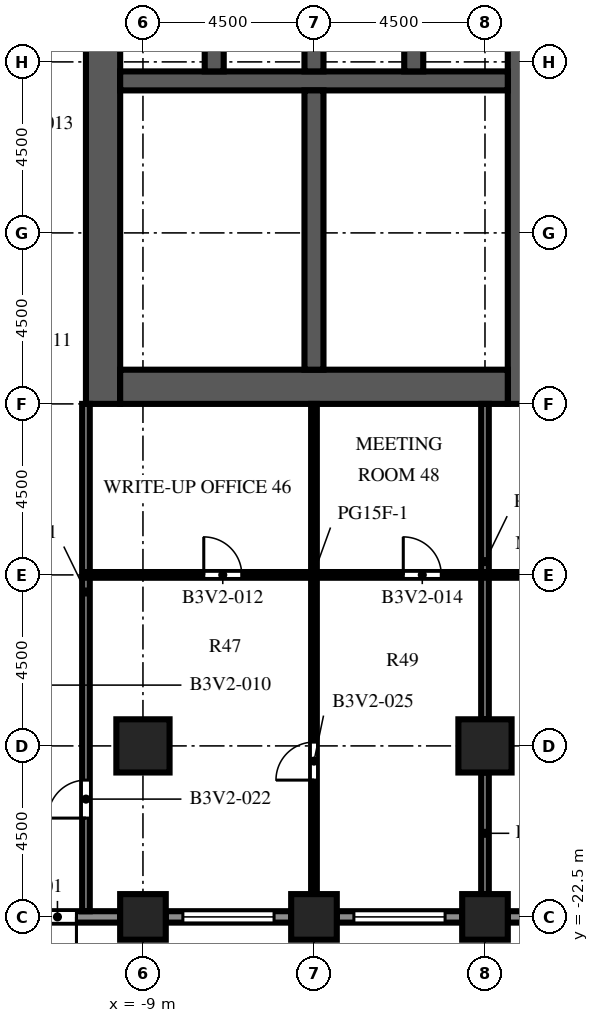
"""IFC4 building model, lengths in metres.
Left out: names, types, materials, properties, quantities, classifications, styles, units other than length and angle.
Written with IfcOpenShell. Run it as: python <this file> out.ifc"""

import sys

from ifc_helpers import new_model, si_unit, direction, frame, frame_2d, origin, origin_2d, place, context, subcontext, project, spatial, rectangle, extrude, element, fill, save


model = new_model("IFC4")
c1 = context("Model", 3, precision=1e-05, world=origin(), true_north=direction((0.0, 1.0)))
c2 = subcontext(c1, "Body", "Model", "MODEL_VIEW")
j1 = project(units=[si_unit("LENGTHUNIT", "METRE"), si_unit("PLANEANGLEUNIT", "RADIAN")], contexts=[c1])
p1 = place(None, origin())
s1 = spatial("IfcSite", under=j1, at=p1, CompositionType="ELEMENT")
p2 = place(p1, origin())
s2 = spatial("IfcBuilding", under=s1, at=p2, CompositionType="ELEMENT")
p3 = place(p2, frame((0.0, 0.0, 102.5)))
s3 = spatial("IfcBuildingStorey", under=s2, at=p3, CompositionType="ELEMENT", Elevation=102.5)
for number, where, z_axis, x_axis in (
    (1, (-9.0, -22.5, 0.0), (0.0, 0.0, 1.0), (1.0, 0.0, 0.0)),
    (2, (-4.5, -22.5, 0.0), (0.0, 0.0, 1.0), (1.0, 0.0, 0.0)),
    (3, (0.0, -22.5, 0.0), (0.0, 0.0, 1.0), (1.0, 0.0, 0.0)),
):
    element("IfcColumn", number, at=place(p3, frame(where, z_axis=z_axis, x_axis=x_axis)), inside=s3, PredefinedType="COLUMN", context=c2, shape_type="SweptSolid", body=[
        extrude(rectangle(XDim=1.2, YDim=1.2, at=origin_2d()), origin(), (0.0, 0.0, 1.0), 4.1),
    ])
for number, where, z_axis, x_axis in (
    (4, (-9.0, -18.0, 0.0), (0.0, 0.0, 1.0), (1.0, 0.0, 0.0)),
    (5, (0.0, -18.0, 0.0), (0.0, 0.0, 1.0), (1.0, 0.0, 0.0)),
):
    element("IfcColumn", number, at=place(p3, frame(where, z_axis=z_axis, x_axis=x_axis)), inside=s3, PredefinedType="COLUMN", context=c2, shape_type="SweptSolid", body=[
        extrude(rectangle(XDim=1.4, YDim=1.4, at=origin_2d()), origin(), (0.0, 0.0, 1.0), 4.1),
    ])
p4 = place(p3, frame((-10.05, -9.0, 0.0), z_axis=(0.0, 0.0, 1.0), x_axis=(0.0, 1.0, 0.0)))
e6 = element("IfcWall", 6, at=p4, inside=s3, PredefinedType="SHEAR", context=c2, shape_type="SweptSolid", body=[
    extrude(rectangle(XDim=27.5, YDim=0.9, at=frame_2d((13.75, 0.0))), origin(), (0.0, 0.0, 1.0), 4.1),
])
p5 = place(p4, frame((12.55, 0.0, 0.0)))
e7 = element("IfcOpeningElement", 7, at=p5, cuts=e6, PredefinedType="OPENING", context=c2, shape_type="SweptSolid", body=[
    extrude(rectangle(XDim=2.4, YDim=2.4, at=frame_2d((1.2, 1.2))), frame((0.0, 0.46, 0.0), z_axis=(0.0, -1.0, 0.0), x_axis=(1.0, 0.0, 0.0)), (0.0, 0.0, 1.0), 0.92),
])
p6 = place(p4, frame((6.825, 0.0, 0.0)))
e8 = element("IfcOpeningElement", 8, at=p6, cuts=e6, PredefinedType="OPENING", context=c2, shape_type="SweptSolid", body=[
    extrude(rectangle(XDim=1.2, YDim=2.1, at=frame_2d((0.6, 1.05))), frame((0.0, 0.46, 0.0), z_axis=(0.0, -1.0, 0.0), x_axis=(1.0, 0.0, 0.0)), (0.0, 0.0, 1.0), 0.92),
])
p7 = place(p4, frame((19.475, 0.0, 0.0)))
e9 = element("IfcOpeningElement", 9, at=p7, cuts=e6, PredefinedType="OPENING", context=c2, shape_type="SweptSolid", body=[
    extrude(rectangle(XDim=1.2, YDim=2.1, at=frame_2d((0.6, 1.05))), frame((0.0, 0.46, 0.0), z_axis=(0.0, -1.0, 0.0), x_axis=(1.0, 0.0, 0.0)), (0.0, 0.0, 1.0), 0.92),
])
p8 = place(p3, frame((1.05, -9.0, 0.0), z_axis=(0.0, 0.0, 1.0), x_axis=(0.0, 1.0, 0.0)))
e10 = element("IfcWall", 10, at=p8, inside=s3, PredefinedType="SHEAR", context=c2, shape_type="SweptSolid", body=[
    extrude(rectangle(XDim=27.5, YDim=0.9, at=frame_2d((13.75, 0.0))), origin(), (0.0, 0.0, 1.0), 4.1),
])
p9 = place(p8, frame((12.55, 0.0, 0.0)))
e11 = element("IfcOpeningElement", 11, at=p9, cuts=e10, PredefinedType="OPENING", context=c2, shape_type="SweptSolid", body=[
    extrude(rectangle(XDim=2.4, YDim=2.4, at=frame_2d((1.2, 1.2))), frame((0.0, 0.46, 0.0), z_axis=(0.0, -1.0, 0.0), x_axis=(1.0, 0.0, 0.0)), (0.0, 0.0, 1.0), 0.92),
])
p10 = place(p8, frame((3.893, 0.0, 0.0)))
e12 = element("IfcOpeningElement", 12, at=p10, cuts=e10, PredefinedType="OPENING", context=c2, shape_type="SweptSolid", body=[
    extrude(rectangle(XDim=0.923, YDim=2.1, at=frame_2d((0.461, 1.05))), frame((0.0, 0.46, 0.0), z_axis=(0.0, -1.0, 0.0), x_axis=(1.0, 0.0, 0.0)), (0.0, 0.0, 1.0), 0.92),
])
p11 = place(p8, frame((23.427, 0.0, 0.0)))
e13 = element("IfcOpeningElement", 13, at=p11, cuts=e10, PredefinedType="OPENING", context=c2, shape_type="SweptSolid", body=[
    extrude(rectangle(XDim=1.2, YDim=2.1, at=frame_2d((0.6, 1.05))), frame((0.0, 0.46, 0.0), z_axis=(0.0, -1.0, 0.0), x_axis=(1.0, 0.0, 0.0)), (0.0, 0.0, 1.0), 0.92),
])
p12 = place(p3, frame((-9.6, -8.55, 0.0), z_axis=(0.0, 0.0, 1.0), x_axis=(1.0, 0.0, 0.0)))
e14 = element("IfcWall", 14, at=p12, inside=s3, PredefinedType="SHEAR", context=c2, shape_type="SweptSolid", body=[
    extrude(rectangle(XDim=10.2, YDim=0.9, at=frame_2d((5.1, 0.0))), origin(), (0.0, 0.0, 1.0), 4.1),
])
p13 = place(p3, frame((-9.6, -0.5, 0.0), z_axis=(0.0, 0.0, 1.0), x_axis=(1.0, 0.0, 0.0)))
e15 = element("IfcWall", 15, at=p13, inside=s3, PredefinedType="SHEAR", context=c2, shape_type="SweptSolid", body=[
    extrude(rectangle(XDim=10.2, YDim=0.5, at=frame_2d((5.1, 0.0))), origin(), (0.0, 0.0, 1.0), 4.1),
])
for number, where, z_axis, x_axis in (
    (16, (-7.125, -0.25, 0.0), (0.0, 0.0, 1.0), (0.0, 1.0, 0.0)),
    (17, (-4.5, -0.25, 0.0), (0.0, 0.0, 1.0), (0.0, 1.0, 0.0)),
    (18, (-1.875, -0.25, 0.0), (0.0, 0.0, 1.0), (0.0, 1.0, 0.0)),
):
    element("IfcWall", number, at=place(p3, frame(where, z_axis=z_axis, x_axis=x_axis)), inside=s3, PredefinedType="SHEAR", context=c2, shape_type="SweptSolid", body=[
        extrude(rectangle(XDim=2.8, YDim=0.5, at=frame_2d((1.4, 0.0))), origin(), (0.0, 0.0, 1.0), 4.1),
    ])
p14 = place(p3, frame((-4.5, -8.1, 0.0), z_axis=(0.0, 0.0, 1.0), x_axis=(0.0, 1.0, 0.0)))
e19 = element("IfcWall", 19, at=p14, inside=s3, PredefinedType="SHEAR", context=c2, shape_type="SweptSolid", body=[
    extrude(rectangle(XDim=7.35, YDim=0.5, at=frame_2d((3.675, 0.0))), origin(), (0.0, 0.0, 1.0), 4.1),
])
p15 = place(p3, frame((-9.6, -22.5, 0.0), z_axis=(0.0, 0.0, 1.0), x_axis=(-1.0, 0.0, 0.0)))
e20 = element("IfcWall", 20, at=p15, inside=s3, PredefinedType="SOLIDWALL", context=c2, shape_type="SweptSolid", body=[
    extrude(rectangle(XDim=3.3, YDim=0.3, at=frame_2d((1.65, 0.0))), origin(), (0.0, 0.0, 1.0), 2.75),
])
p16 = place(p15, frame((1.15, 0.0, 0.0)))
e21 = element("IfcOpeningElement", 21, at=p16, cuts=e20, PredefinedType="OPENING", context=c2, shape_type="SweptSolid", body=[
    extrude(rectangle(XDim=1.0, YDim=2.2, at=frame_2d((0.5, 1.1))), frame((0.0, 0.16, 0.0), z_axis=(0.0, -1.0, 0.0), x_axis=(1.0, 0.0, 0.0)), (0.0, 0.0, 1.0), 0.32),
])
p17 = place(p3, frame((-5.1, -22.5, 0.0), z_axis=(0.0, 0.0, 1.0), x_axis=(-1.0, 0.0, 0.0)))
e22 = element("IfcWall", 22, at=p17, inside=s3, PredefinedType="SOLIDWALL", context=c2, shape_type="SweptSolid", body=[
    extrude(rectangle(XDim=3.3, YDim=0.3, at=frame_2d((1.65, 0.0))), origin(), (0.0, 0.0, 1.0), 2.75),
])
p18 = place(p17, frame((0.45, 0.0, 0.8)))
e23 = element("IfcOpeningElement", 23, at=p18, cuts=e22, PredefinedType="OPENING", context=c2, shape_type="SweptSolid", body=[
    extrude(rectangle(XDim=2.4, YDim=1.7, at=frame_2d((1.2, 0.85))), frame((0.0, 0.16, 0.0), z_axis=(0.0, -1.0, 0.0), x_axis=(1.0, 0.0, 0.0)), (0.0, 0.0, 1.0), 0.32),
])
p19 = place(p3, frame((-0.6, -22.5, 0.0), z_axis=(0.0, 0.0, 1.0), x_axis=(-1.0, 0.0, 0.0)))
e24 = element("IfcWall", 24, at=p19, inside=s3, PredefinedType="SOLIDWALL", context=c2, shape_type="SweptSolid", body=[
    extrude(rectangle(XDim=3.3, YDim=0.3, at=frame_2d((1.65, 0.0))), origin(), (0.0, 0.0, 1.0), 2.75),
])
p20 = place(p19, frame((0.45, 0.0, 0.8)))
e25 = element("IfcOpeningElement", 25, at=p20, cuts=e24, PredefinedType="OPENING", context=c2, shape_type="SweptSolid", body=[
    extrude(rectangle(XDim=2.4, YDim=1.7, at=frame_2d((1.2, 0.85))), frame((0.0, 0.16, 0.0), z_axis=(0.0, -1.0, 0.0), x_axis=(1.0, 0.0, 0.0)), (0.0, 0.0, 1.0), 0.32),
])
p21 = place(p3, frame((3.9, -22.5, 0.0), z_axis=(0.0, 0.0, 1.0), x_axis=(-1.0, 0.0, 0.0)))
e26 = element("IfcWall", 26, at=p21, inside=s3, PredefinedType="SOLIDWALL", context=c2, shape_type="SweptSolid", body=[
    extrude(rectangle(XDim=3.3, YDim=0.3, at=frame_2d((1.65, 0.0))), origin(), (0.0, 0.0, 1.0), 2.75),
])
p22 = place(p21, frame((0.45, 0.0, 0.8)))
e27 = element("IfcOpeningElement", 27, at=p22, cuts=e26, PredefinedType="OPENING", context=c2, shape_type="SweptSolid", body=[
    extrude(rectangle(XDim=2.4, YDim=1.7, at=frame_2d((1.2, 0.85))), frame((0.0, 0.16, 0.0), z_axis=(0.0, -1.0, 0.0), x_axis=(1.0, 0.0, 0.0)), (0.0, 0.0, 1.0), 0.32),
])
p23 = place(p3, frame((-4.25, -5.307, 0.0), z_axis=(0.0, 0.0, 1.0), x_axis=(1.0, 0.0, 0.0)))
e28 = element("IfcWall", 28, at=p23, inside=s3, PredefinedType="PARTITIONING", context=c2, shape_type="SweptSolid", body=[
    extrude(rectangle(XDim=4.85, YDim=0.1, at=frame_2d((2.425, 0.0))), origin(), (0.0, 0.0, 1.0), 3.65),
])
p24 = place(p23, frame((1.925, 0.0, 0.0)))
e29 = element("IfcOpeningElement", 29, at=p24, cuts=e28, PredefinedType="OPENING", context=c2, shape_type="SweptSolid", body=[
    extrude(rectangle(XDim=1.0, YDim=2.1, at=frame_2d((0.5, 1.05))), frame((0.0, 0.06, 0.0), z_axis=(0.0, -1.0, 0.0), x_axis=(1.0, 0.0, 0.0)), (0.0, 0.0, 1.0), 0.12),
])
p25 = place(p3, frame((-2.407, -3.984, 0.0), z_axis=(0.0, 0.0, 1.0), x_axis=(1.0, 0.0, 0.0)))
e30 = element("IfcWall", 30, at=p25, inside=s3, PredefinedType="PARTITIONING", context=c2, shape_type="SweptSolid", body=[
    extrude(rectangle(XDim=3.007, YDim=0.1, at=frame_2d((1.503, 0.0))), origin(), (0.0, 0.0, 1.0), 3.65),
])
p26 = place(p25, frame((1.003, 0.0, 0.0)))
e31 = element("IfcOpeningElement", 31, at=p26, cuts=e30, PredefinedType="OPENING", context=c2, shape_type="SweptSolid", body=[
    extrude(rectangle(XDim=1.0, YDim=2.1, at=frame_2d((0.5, 1.05))), frame((0.0, 0.06, 0.0), z_axis=(0.0, -1.0, 0.0), x_axis=(1.0, 0.0, 0.0)), (0.0, 0.0, 1.0), 0.12),
])
p27 = place(p3, frame((-4.25, -3.984, 0.0), z_axis=(0.0, 0.0, 1.0), x_axis=(1.0, 0.0, 0.0)))
e32 = element("IfcWall", 32, at=p27, inside=s3, PredefinedType="PARTITIONING", context=c2, shape_type="SweptSolid", body=[
    extrude(rectangle(XDim=1.843, YDim=0.1, at=frame_2d((0.921, 0.0))), origin(), (0.0, 0.0, 1.0), 3.65),
])
p28 = place(p27, frame((0.421, 0.0, 0.0)))
e33 = element("IfcOpeningElement", 33, at=p28, cuts=e32, PredefinedType="OPENING", context=c2, shape_type="SweptSolid", body=[
    extrude(rectangle(XDim=1.0, YDim=2.1, at=frame_2d((0.5, 1.05))), frame((0.0, 0.06, 0.0), z_axis=(0.0, -1.0, 0.0), x_axis=(1.0, 0.0, 0.0)), (0.0, 0.0, 1.0), 0.12),
])
p29 = place(p3, frame((-2.407, -3.984, 0.0), z_axis=(0.0, 0.0, 1.0), x_axis=(0.0, 1.0, 0.0)))
e34 = element("IfcWall", 34, at=p29, inside=s3, PredefinedType="PARTITIONING", context=c2, shape_type="SweptSolid", body=[
    extrude(rectangle(XDim=3.234, YDim=0.1, at=frame_2d((1.617, 0.0))), origin(), (0.0, 0.0, 1.0), 3.65),
])
p30 = place(p3, frame((-10.5, -9.0, 0.0), z_axis=(0.0, 0.0, 1.0), x_axis=(0.0, -1.0, 0.0)))
e35 = element("IfcWall", 35, at=p30, inside=s3, PredefinedType="PARTITIONING", context=c2, shape_type="SweptSolid", body=[
    extrude(rectangle(XDim=13.35, YDim=0.2, at=frame_2d((6.675, 0.0))), origin(), (0.0, 0.0, 1.0), 3.65),
])
p31 = place(p30, frame((9.9, 0.0, 0.0)))
e36 = element("IfcOpeningElement", 36, at=p31, cuts=e35, PredefinedType="OPENING", context=c2, shape_type="SweptSolid", body=[
    extrude(rectangle(XDim=1.0, YDim=2.1, at=frame_2d((0.5, 1.05))), frame((0.0, 0.11, 0.0), z_axis=(0.0, -1.0, 0.0), x_axis=(1.0, 0.0, 0.0)), (0.0, 0.0, 1.0), 0.22),
])
p32 = place(p3, frame((-4.5, -9.0, 0.0), z_axis=(0.0, 0.0, 1.0), x_axis=(0.0, -1.0, 0.0)))
e37 = element("IfcWall", 37, at=p32, inside=s3, PredefinedType="PARTITIONING", context=c2, shape_type="SweptSolid", body=[
    extrude(rectangle(XDim=12.9, YDim=0.15, at=frame_2d((6.45, 0.0))), origin(), (0.0, 0.0, 1.0), 3.65),
])
p33 = place(p32, frame((8.9, 0.0, 0.0)))
e38 = element("IfcOpeningElement", 38, at=p33, cuts=e37, PredefinedType="OPENING", context=c2, shape_type="SweptSolid", body=[
    extrude(rectangle(XDim=1.0, YDim=2.1, at=frame_2d((0.5, 1.05))), frame((0.0, 0.085, 0.0), z_axis=(0.0, -1.0, 0.0), x_axis=(1.0, 0.0, 0.0)), (0.0, 0.0, 1.0), 0.17),
])
p34 = place(p3, frame((0.0, -21.9, 0.0), z_axis=(0.0, 0.0, 1.0), x_axis=(0.0, 1.0, 0.0)))
e39 = element("IfcWall", 39, at=p34, inside=s3, PredefinedType="PARTITIONING", context=c2, shape_type="SweptSolid", body=[
    extrude(rectangle(XDim=3.2, YDim=0.2, at=frame_2d((1.6, 0.0))), origin(), (0.0, 0.0, 1.0), 3.65),
])
p35 = place(p3, frame((0.0, -17.3, 0.0), z_axis=(0.0, 0.0, 1.0), x_axis=(0.0, 1.0, 0.0)))
e40 = element("IfcWall", 40, at=p35, inside=s3, PredefinedType="PARTITIONING", context=c2, shape_type="SweptSolid", body=[
    extrude(rectangle(XDim=8.3, YDim=0.2, at=frame_2d((4.15, 0.0))), origin(), (0.0, 0.0, 1.0), 3.65),
])
p36 = place(p3, frame((-10.5, -13.5, 0.0), z_axis=(0.0, 0.0, 1.0), x_axis=(1.0, 0.0, 0.0)))
e41 = element("IfcWall", 41, at=p36, inside=s3, PredefinedType="PARTITIONING", context=c2, shape_type="SweptSolid", body=[
    extrude(rectangle(XDim=28.5, YDim=0.15, at=frame_2d((14.25, 0.0))), origin(), (0.0, 0.0, 1.0), 3.65),
])
p37 = place(p36, frame((3.1, 0.0, 0.0)))
e42 = element("IfcOpeningElement", 42, at=p37, cuts=e41, PredefinedType="OPENING", context=c2, shape_type="SweptSolid", body=[
    extrude(rectangle(XDim=1.0, YDim=2.1, at=frame_2d((0.5, 1.05))), frame((0.0, 0.085, 0.0), z_axis=(0.0, -1.0, 0.0), x_axis=(1.0, 0.0, 0.0)), (0.0, 0.0, 1.0), 0.17),
])
p38 = place(p36, frame((8.35, 0.0, 0.0)))
e43 = element("IfcOpeningElement", 43, at=p38, cuts=e41, PredefinedType="OPENING", context=c2, shape_type="SweptSolid", body=[
    extrude(rectangle(XDim=1.0, YDim=2.1, at=frame_2d((0.5, 1.05))), frame((0.0, 0.085, 0.0), z_axis=(0.0, -1.0, 0.0), x_axis=(1.0, 0.0, 0.0)), (0.0, 0.0, 1.0), 0.17),
])
p39 = place(p36, frame((13.85, 0.0, 0.0)))
e44 = element("IfcOpeningElement", 44, at=p39, cuts=e41, PredefinedType="OPENING", context=c2, shape_type="SweptSolid", body=[
    extrude(rectangle(XDim=1.0, YDim=2.1, at=frame_2d((0.5, 1.05))), frame((0.0, 0.085, 0.0), z_axis=(0.0, -1.0, 0.0), x_axis=(1.0, 0.0, 0.0)), (0.0, 0.0, 1.0), 0.17),
])
p40 = place(p36, frame((21.85, 0.0, 0.0)))
e45 = element("IfcOpeningElement", 45, at=p40, cuts=e41, PredefinedType="OPENING", context=c2, shape_type="SweptSolid", body=[
    extrude(rectangle(XDim=1.0, YDim=2.1, at=frame_2d((0.5, 1.05))), frame((0.0, 0.085, 0.0), z_axis=(0.0, -1.0, 0.0), x_axis=(1.0, 0.0, 0.0)), (0.0, 0.0, 1.0), 0.17),
])
p41 = place(p36, frame((25.85, 0.0, 0.0)))
e46 = element("IfcOpeningElement", 46, at=p41, cuts=e41, PredefinedType="OPENING", context=c2, shape_type="SweptSolid", body=[
    extrude(rectangle(XDim=1.0, YDim=2.1, at=frame_2d((0.5, 1.05))), frame((0.0, 0.085, 0.0), z_axis=(0.0, -1.0, 0.0), x_axis=(1.0, 0.0, 0.0)), (0.0, 0.0, 1.0), 0.17),
])
p42 = place(p16, origin())
e47 = element("IfcDoor", 47, at=p42, inside=s3, OperationType="SINGLE_SWING_LEFT", PredefinedType="DOOR", context=c2, shape_type="SweptSolid", body=[
    extrude(rectangle(XDim=1.0, YDim=2.2, at=frame_2d((0.5, 1.1))), frame((0.0, 0.025, 0.0), z_axis=(0.0, -1.0, 0.0), x_axis=(1.0, 0.0, 0.0)), (0.0, 0.0, 1.0), 0.05),
])
fill(e21, e47)
p43 = place(p18, origin())
e48 = element("IfcWindow", 48, at=p43, inside=s3, PartitioningType="SINGLE_PANEL", PredefinedType="WINDOW", context=c2, shape_type="SweptSolid", body=[
    extrude(rectangle(XDim=2.4, YDim=1.7, at=frame_2d((1.2, 0.85))), frame((0.0, 0.03, 0.0), z_axis=(0.0, -1.0, 0.0), x_axis=(1.0, 0.0, 0.0)), (0.0, 0.0, 1.0), 0.06),
])
fill(e23, e48)
p44 = place(p20, origin())
e49 = element("IfcWindow", 49, at=p44, inside=s3, PartitioningType="SINGLE_PANEL", PredefinedType="WINDOW", context=c2, shape_type="SweptSolid", body=[
    extrude(rectangle(XDim=2.4, YDim=1.7, at=frame_2d((1.2, 0.85))), frame((0.0, 0.03, 0.0), z_axis=(0.0, -1.0, 0.0), x_axis=(1.0, 0.0, 0.0)), (0.0, 0.0, 1.0), 0.06),
])
fill(e25, e49)
p45 = place(p6, origin())
e50 = element("IfcDoor", 50, at=p45, inside=s3, OperationType="SINGLE_SWING_LEFT", PredefinedType="DOOR", context=c2, shape_type="SweptSolid", body=[
    extrude(rectangle(XDim=1.2, YDim=2.1, at=frame_2d((0.6, 1.05))), frame((0.0, 0.025, 0.0), z_axis=(0.0, -1.0, 0.0), x_axis=(1.0, 0.0, 0.0)), (0.0, 0.0, 1.0), 0.05),
])
fill(e8, e50)
p46 = place(p10, origin())
e51 = element("IfcDoor", 51, at=p46, inside=s3, OperationType="SINGLE_SWING_LEFT", PredefinedType="DOOR", context=c2, shape_type="SweptSolid", body=[
    extrude(rectangle(XDim=0.923, YDim=2.1, at=frame_2d((0.461, 1.05))), frame((0.0, 0.425, 0.0), z_axis=(0.0, -1.0, 0.0), x_axis=(1.0, 0.0, 0.0)), (0.0, 0.0, 1.0), 0.05),
])
fill(e12, e51)
p47 = place(p24, origin())
e52 = element("IfcDoor", 52, at=p47, inside=s3, OperationType="SINGLE_SWING_RIGHT", PredefinedType="DOOR", context=c2, shape_type="SweptSolid", body=[
    extrude(rectangle(XDim=1.0, YDim=2.1, at=frame_2d((0.5, 1.05))), frame((0.0, 0.025, 0.0), z_axis=(0.0, -1.0, 0.0), x_axis=(1.0, 0.0, 0.0)), (0.0, 0.0, 1.0), 0.05),
])
fill(e29, e52)
p48 = place(p26, origin())
e53 = element("IfcDoor", 53, at=p48, inside=s3, OperationType="SINGLE_SWING_LEFT", PredefinedType="DOOR", context=c2, shape_type="SweptSolid", body=[
    extrude(rectangle(XDim=1.0, YDim=2.1, at=frame_2d((0.5, 1.05))), frame((0.0, 0.025, 0.0), z_axis=(0.0, -1.0, 0.0), x_axis=(1.0, 0.0, 0.0)), (0.0, 0.0, 1.0), 0.05),
])
fill(e31, e53)
p49 = place(p28, origin())
e54 = element("IfcDoor", 54, at=p49, inside=s3, OperationType="SINGLE_SWING_RIGHT", PredefinedType="DOOR", context=c2, shape_type="SweptSolid", body=[
    extrude(rectangle(XDim=1.0, YDim=2.1, at=frame_2d((0.5, 1.05))), frame((0.0, 0.025, 0.0), z_axis=(0.0, -1.0, 0.0), x_axis=(1.0, 0.0, 0.0)), (0.0, 0.0, 1.0), 0.05),
])
fill(e33, e54)
p50 = place(p37, origin())
e55 = element("IfcDoor", 55, at=p50, inside=s3, OperationType="SINGLE_SWING_LEFT", PredefinedType="DOOR", context=c2, shape_type="SweptSolid", body=[
    extrude(rectangle(XDim=1.0, YDim=2.1, at=frame_2d((0.5, 1.05))), frame((0.0, 0.025, 0.0), z_axis=(0.0, -1.0, 0.0), x_axis=(1.0, 0.0, 0.0)), (0.0, 0.0, 1.0), 0.05),
])
fill(e42, e55)
p51 = place(p38, origin())
e56 = element("IfcDoor", 56, at=p51, inside=s3, OperationType="SINGLE_SWING_LEFT", PredefinedType="DOOR", context=c2, shape_type="SweptSolid", body=[
    extrude(rectangle(XDim=1.0, YDim=2.1, at=frame_2d((0.5, 1.05))), frame((0.0, 0.025, 0.0), z_axis=(0.0, -1.0, 0.0), x_axis=(1.0, 0.0, 0.0)), (0.0, 0.0, 1.0), 0.05),
])
fill(e43, e56)
p52 = place(p31, origin())
e57 = element("IfcDoor", 57, at=p52, inside=s3, OperationType="SINGLE_SWING_RIGHT", PredefinedType="DOOR", context=c2, shape_type="SweptSolid", body=[
    extrude(rectangle(XDim=1.0, YDim=2.1, at=frame_2d((0.5, 1.05))), frame((0.0, 0.025, 0.0), z_axis=(0.0, -1.0, 0.0), x_axis=(1.0, 0.0, 0.0)), (0.0, 0.0, 1.0), 0.05),
])
fill(e36, e57)
p53 = place(p33, origin())
e58 = element("IfcDoor", 58, at=p53, inside=s3, OperationType="SINGLE_SWING_RIGHT", PredefinedType="DOOR", context=c2, shape_type="SweptSolid", body=[
    extrude(rectangle(XDim=1.0, YDim=2.1, at=frame_2d((0.5, 1.05))), frame((0.0, 0.025, 0.0), z_axis=(0.0, -1.0, 0.0), x_axis=(1.0, 0.0, 0.0)), (0.0, 0.0, 1.0), 0.05),
])
fill(e38, e58)
save(model, sys.argv[1])
